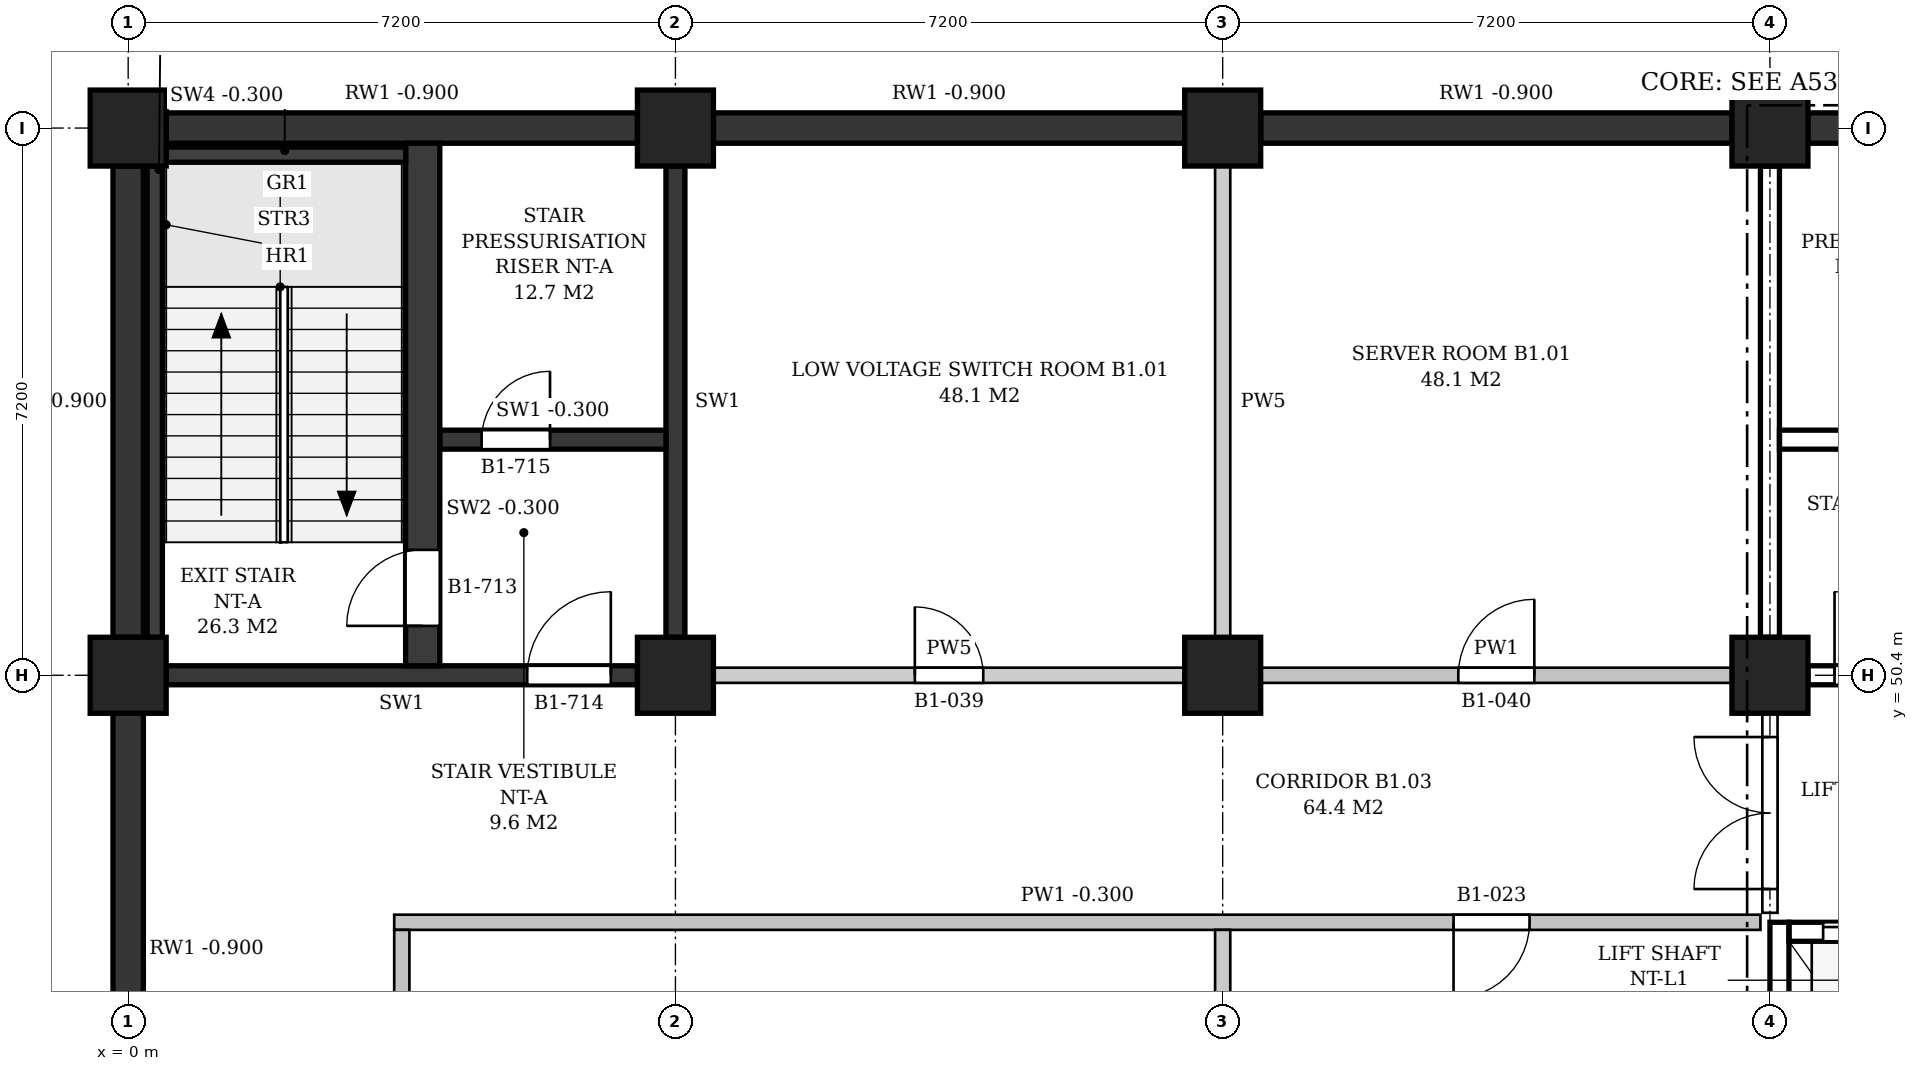
"""IFC4 building model, lengths in metres.
Left out: names, types, materials, properties, quantities, classifications, styles, units other than length and angle.
Written with IfcOpenShell. Run it as: python <this file> out.ifc"""

import sys

from ifc_helpers import new_model, si_unit, direction, frame, frame_2d, origin, origin_2d, place, context, subcontext, project, spatial, polyline, rectangle, outline, extrude, element, fill, save


model = new_model("IFC4")
c1 = context("Model", 3, precision=1e-05, world=origin(), true_north=direction((0.0, 1.0)))
c2 = subcontext(c1, "Body", "Model", "MODEL_VIEW")
j1 = project(units=[si_unit("LENGTHUNIT", "METRE"), si_unit("PLANEANGLEUNIT", "RADIAN")], contexts=[c1])
p1 = place(None, origin())
s1 = spatial("IfcSite", under=j1, at=p1, CompositionType="ELEMENT")
p2 = place(p1, origin())
s2 = spatial("IfcBuilding", under=s1, at=p2, CompositionType="ELEMENT")
p3 = place(p2, frame((0.0, 0.0, -4.5)))
s3 = spatial("IfcBuildingStorey", under=s2, at=p3, CompositionType="ELEMENT", Elevation=-4.5)
for number, where, z_axis, x_axis in (
    (1, (0.0, 50.4, 0.0), (0.0, 0.0, 1.0), (1.0, 0.0, 0.0)),
    (2, (0.0, 57.6, 0.0), (0.0, 0.0, 1.0), (1.0, 0.0, 0.0)),
    (3, (7.2, 50.4, 0.0), (0.0, 0.0, 1.0), (1.0, 0.0, 0.0)),
    (4, (7.2, 57.6, 0.0), (0.0, 0.0, 1.0), (1.0, 0.0, 0.0)),
    (5, (14.4, 50.4, 0.0), (0.0, 0.0, 1.0), (1.0, 0.0, 0.0)),
    (6, (14.4, 57.6, 0.0), (0.0, 0.0, 1.0), (1.0, 0.0, 0.0)),
    (7, (21.6, 50.4, 0.0), (0.0, 0.0, 1.0), (1.0, 0.0, 0.0)),
    (8, (21.6, 57.6, 0.0), (0.0, 0.0, 1.0), (1.0, 0.0, 0.0)),
):
    element("IfcColumn", number, at=place(p3, frame(where, z_axis=z_axis, x_axis=x_axis)), inside=s3, PredefinedType="COLUMN", context=c2, shape_type="SweptSolid", body=[
        extrude(rectangle(XDim=1.0, YDim=1.0, at=origin_2d()), origin(), (0.0, 0.0, 1.0), 4.5),
    ])
p4 = place(p3, frame((28.3, 57.6, 0.0), z_axis=(0.0, 0.0, 1.0), x_axis=(-1.0, 0.0, 0.0)))
e9 = element("IfcWall", 9, at=p4, inside=s3, PredefinedType="SOLIDWALL", context=c2, shape_type="SweptSolid", body=[
    extrude(rectangle(XDim=6.2, YDim=0.4, at=frame_2d((3.1, 0.0))), origin(), (0.0, 0.0, 1.0), 3.6),
])
p5 = place(p3, frame((21.1, 57.6, 0.0), z_axis=(0.0, 0.0, 1.0), x_axis=(-1.0, 0.0, 0.0)))
e10 = element("IfcWall", 10, at=p5, inside=s3, PredefinedType="SOLIDWALL", context=c2, shape_type="SweptSolid", body=[
    extrude(rectangle(XDim=6.2, YDim=0.4, at=frame_2d((3.1, 0.0))), origin(), (0.0, 0.0, 1.0), 3.6),
])
for number, where, z_axis, x_axis in (
    (11, (13.9, 57.6, 0.0), (0.0, 0.0, 1.0), (-1.0, 0.0, 0.0)),
    (12, (6.7, 57.6, 0.0), (0.0, 0.0, 1.0), (-1.0, 0.0, 0.0)),
):
    element("IfcWall", number, at=place(p3, frame(where, z_axis=z_axis, x_axis=x_axis)), inside=s3, PredefinedType="SOLIDWALL", context=c2, shape_type="SweptSolid", body=[
        extrude(rectangle(XDim=6.2, YDim=0.4, at=frame_2d((3.1, 0.0))), origin(), (0.0, 0.0, 1.0), 3.6),
    ])
p6 = place(p3, frame((0.0, 57.1, 0.0), z_axis=(0.0, 0.0, 1.0), x_axis=(0.0, -1.0, 0.0)))
e13 = element("IfcWall", 13, at=p6, inside=s3, PredefinedType="SOLIDWALL", context=c2, shape_type="SweptSolid", body=[
    extrude(rectangle(XDim=6.2, YDim=0.4, at=frame_2d((3.1, 0.0))), origin(), (0.0, 0.0, 1.0), 3.6),
])
p7 = place(p3, frame((0.0, 49.9, 0.0), z_axis=(0.0, 0.0, 1.0), x_axis=(0.0, -1.0, 0.0)))
e14 = element("IfcWall", 14, at=p7, inside=s3, PredefinedType="SOLIDWALL", context=c2, shape_type="SweptSolid", body=[
    extrude(rectangle(XDim=6.2, YDim=0.4, at=frame_2d((3.1, 0.0))), origin(), (0.0, 0.0, 1.0), 3.6),
])
p8 = place(p3, frame((0.5, 50.4, 0.0), z_axis=(0.0, 0.0, 1.0), x_axis=(1.0, 0.0, 0.0)))
e15 = element("IfcWall", 15, at=p8, inside=s3, PredefinedType="SHEAR", context=c2, shape_type="SweptSolid", body=[
    extrude(rectangle(XDim=6.2, YDim=0.25, at=frame_2d((3.1, 0.0))), origin(), (0.0, 0.0, 1.0), 3.4),
])
p9 = place(p8, frame((4.75, 0.0, 0.0)))
e16 = element("IfcOpeningElement", 16, at=p9, cuts=e15, PredefinedType="OPENING", context=c2, shape_type="SweptSolid", body=[
    extrude(rectangle(XDim=1.1, YDim=2.1, at=frame_2d((0.55, 1.05))), frame((0.0, 0.135, 0.0), z_axis=(0.0, -1.0, 0.0), x_axis=(1.0, 0.0, 0.0)), (0.0, 0.0, 1.0), 0.27),
])
p10 = place(p3, frame((7.2, 50.9, 0.0), z_axis=(0.0, 0.0, 1.0), x_axis=(0.0, 1.0, 0.0)))
e17 = element("IfcWall", 17, at=p10, inside=s3, PredefinedType="SHEAR", context=c2, shape_type="SweptSolid", body=[
    extrude(rectangle(XDim=6.2, YDim=0.25, at=frame_2d((3.1, 0.0))), origin(), (0.0, 0.0, 1.0), 3.4),
])
p11 = place(p3, frame((0.35, 50.9, 0.0), z_axis=(0.0, 0.0, 1.0), x_axis=(0.0, 1.0, 0.0)))
e18 = element("IfcWall", 18, at=p11, inside=s3, PredefinedType="SHEAR", context=c2, shape_type="SweptSolid", body=[
    extrude(rectangle(XDim=6.2, YDim=0.2, at=frame_2d((3.1, 0.0))), origin(), (0.0, 0.0, 1.0), 4.2),
])
p12 = place(p3, frame((0.5, 57.25, 0.0), z_axis=(0.0, 0.0, 1.0), x_axis=(1.0, 0.0, 0.0)))
e19 = element("IfcWall", 19, at=p12, inside=s3, PredefinedType="SHEAR", context=c2, shape_type="SweptSolid", body=[
    extrude(rectangle(XDim=3.15, YDim=0.2, at=frame_2d((1.575, 0.0))), origin(), (0.0, 0.0, 1.0), 4.2),
])
p13 = place(p3, frame((3.875, 50.525, 0.0), z_axis=(0.0, 0.0, 1.0), x_axis=(0.0, 1.0, 0.0)))
e20 = element("IfcWall", 20, at=p13, inside=s3, PredefinedType="SHEAR", context=c2, shape_type="SweptSolid", body=[
    extrude(rectangle(XDim=6.875, YDim=0.45, at=frame_2d((3.438, 0.0))), origin(), (0.0, 0.0, 1.0), 4.2),
])
p14 = place(p13, frame((0.525, 0.0, 0.0)))
e21 = element("IfcOpeningElement", 21, at=p14, cuts=e20, PredefinedType="OPENING", context=c2, shape_type="SweptSolid", body=[
    extrude(rectangle(XDim=1.0, YDim=2.1, at=frame_2d((0.5, 1.05))), frame((0.0, 0.235, 0.0), z_axis=(0.0, -1.0, 0.0), x_axis=(1.0, 0.0, 0.0)), (0.0, 0.0, 1.0), 0.47),
])
p15 = place(p3, frame((4.1, 53.5, 0.0), z_axis=(0.0, 0.0, 1.0), x_axis=(1.0, 0.0, 0.0)))
e22 = element("IfcWall", 22, at=p15, inside=s3, PredefinedType="SHEAR", context=c2, shape_type="SweptSolid", body=[
    extrude(rectangle(XDim=2.975, YDim=0.25, at=frame_2d((1.487, 0.0))), origin(), (0.0, 0.0, 1.0), 4.2),
])
p16 = place(p15, frame((0.55, 0.0, 0.0)))
e23 = element("IfcOpeningElement", 23, at=p16, cuts=e22, PredefinedType="OPENING", context=c2, shape_type="SweptSolid", body=[
    extrude(rectangle(XDim=0.9, YDim=2.1, at=frame_2d((0.45, 1.05))), frame((0.0, 0.135, 0.0), z_axis=(0.0, -1.0, 0.0), x_axis=(1.0, 0.0, 0.0)), (0.0, 0.0, 1.0), 0.27),
])
p17 = place(p3, frame((22.1, 50.4, 0.0), z_axis=(0.0, 0.0, 1.0), x_axis=(1.0, 0.0, 0.0)))
e24 = element("IfcWall", 24, at=p17, inside=s3, PredefinedType="SHEAR", context=c2, shape_type="SweptSolid", body=[
    extrude(rectangle(XDim=6.2, YDim=0.25, at=frame_2d((3.1, 0.0))), origin(), (0.0, 0.0, 1.0), 3.4),
])
p18 = place(p17, frame((0.35, 0.0, 0.0)))
e25 = element("IfcOpeningElement", 25, at=p18, cuts=e24, PredefinedType="OPENING", context=c2, shape_type="SweptSolid", body=[
    extrude(rectangle(XDim=1.1, YDim=2.1, at=frame_2d((0.55, 1.05))), frame((0.0, 0.135, 0.0), z_axis=(0.0, -1.0, 0.0), x_axis=(1.0, 0.0, 0.0)), (0.0, 0.0, 1.0), 0.27),
])
p19 = place(p3, frame((21.6, 50.9, 0.0), z_axis=(0.0, 0.0, 1.0), x_axis=(0.0, 1.0, 0.0)))
e26 = element("IfcWall", 26, at=p19, inside=s3, PredefinedType="SHEAR", context=c2, shape_type="SweptSolid", body=[
    extrude(rectangle(XDim=6.2, YDim=0.25, at=frame_2d((3.1, 0.0))), origin(), (0.0, 0.0, 1.0), 3.4),
])
p20 = place(p3, frame((21.725, 53.5, 0.0), z_axis=(0.0, 0.0, 1.0), x_axis=(1.0, 0.0, 0.0)))
e27 = element("IfcWall", 27, at=p20, inside=s3, PredefinedType="SHEAR", context=c2, shape_type="SweptSolid", body=[
    extrude(rectangle(XDim=2.975, YDim=0.25, at=frame_2d((1.487, 0.0))), origin(), (0.0, 0.0, 1.0), 4.2),
])
p21 = place(p20, frame((1.525, 0.0, 0.0)))
e28 = element("IfcOpeningElement", 28, at=p21, cuts=e27, PredefinedType="OPENING", context=c2, shape_type="SweptSolid", body=[
    extrude(rectangle(XDim=0.9, YDim=2.1, at=frame_2d((0.45, 1.05))), frame((0.0, 0.135, 0.0), z_axis=(0.0, -1.0, 0.0), x_axis=(1.0, 0.0, 0.0)), (0.0, 0.0, 1.0), 0.27),
])
p22 = place(p3, frame((21.725, 43.7, -1.6), z_axis=(0.0, 0.0, 1.0), x_axis=(0.0, 1.0, 0.0)))
e29 = element("IfcWall", 29, at=p22, inside=s3, PredefinedType="SHEAR", context=c2, shape_type="SweptSolid", body=[
    extrude(rectangle(XDim=3.45, YDim=0.25, at=frame_2d((1.725, 0.0))), origin(), (0.0, 0.0, 1.0), 5.0),
])
p23 = place(p3, frame((21.85, 47.025, 0.0), z_axis=(0.0, 0.0, 1.0), x_axis=(1.0, 0.0, 0.0)))
e30 = element("IfcWall", 30, at=p23, inside=s3, PredefinedType="SHEAR", context=c2, shape_type="SweptSolid", body=[
    extrude(rectangle(XDim=2.0, YDim=0.25, at=frame_2d((1.0, 0.0))), origin(), (0.0, 0.0, 1.0), 4.2),
])
p24 = place(p23, frame((0.45, 0.0, 0.0)))
e31 = element("IfcOpeningElement", 31, at=p24, cuts=e30, PredefinedType="OPENING", context=c2, shape_type="SweptSolid", body=[
    extrude(rectangle(XDim=1.1, YDim=2.1, at=frame_2d((0.55, 1.05))), frame((0.0, 0.135, 0.0), z_axis=(0.0, -1.0, 0.0), x_axis=(1.0, 0.0, 0.0)), (0.0, 0.0, 1.0), 0.27),
])
p25 = place(p3, frame((3.5, 47.15, 0.0), z_axis=(0.0, 0.0, 1.0), x_axis=(1.0, 0.0, 0.0)))
e32 = element("IfcWall", 32, at=p25, inside=s3, PredefinedType="PARTITIONING", context=c2, shape_type="SweptSolid", body=[
    extrude(outline(polyline([(0.0, 0.0), (17.975, 0.0), (17.975, 3.4), (17.8, 3.4), (17.8, 4.2), (11.2, 4.2), (11.2, 3.4), (10.6, 3.4), (10.6, 4.2), (4.0, 4.2), (4.0, 3.4), (3.4, 3.4), (3.4, 4.2), (0.0, 4.2), (0.0, 0.0)])), frame((0.0, 0.1, 0.0), z_axis=(0.0, -1.0, 0.0), x_axis=(1.0, 0.0, 0.0)), (0.0, 0.0, 1.0), 0.2),
])
p26 = place(p25, frame((13.938, 0.0, 0.0)))
e33 = element("IfcOpeningElement", 33, at=p26, cuts=e32, PredefinedType="OPENING", context=c2, shape_type="SweptSolid", body=[
    extrude(rectangle(XDim=1.0, YDim=2.1, at=frame_2d((0.5, 1.05))), frame((0.0, 0.11, 0.0), z_axis=(0.0, -1.0, 0.0), x_axis=(1.0, 0.0, 0.0)), (0.0, 0.0, 1.0), 0.22),
])
p27 = place(p3, frame((7.7, 50.4, 0.0), z_axis=(0.0, 0.0, 1.0), x_axis=(1.0, 0.0, 0.0)))
e34 = element("IfcWall", 34, at=p27, inside=s3, PredefinedType="SOLIDWALL", context=c2, shape_type="SweptSolid", body=[
    extrude(rectangle(XDim=6.2, YDim=0.2, at=frame_2d((3.1, 0.0))), origin(), (0.0, 0.0, 1.0), 3.4),
])
p28 = place(p27, frame((2.65, 0.0, 0.0)))
e35 = element("IfcOpeningElement", 35, at=p28, cuts=e34, PredefinedType="OPENING", context=c2, shape_type="SweptSolid", body=[
    extrude(rectangle(XDim=0.9, YDim=2.1, at=frame_2d((0.45, 1.05))), frame((0.0, 0.11, 0.0), z_axis=(0.0, -1.0, 0.0), x_axis=(1.0, 0.0, 0.0)), (0.0, 0.0, 1.0), 0.22),
])
p29 = place(p3, frame((14.9, 50.4, 0.0), z_axis=(0.0, 0.0, 1.0), x_axis=(1.0, 0.0, 0.0)))
e36 = element("IfcWall", 36, at=p29, inside=s3, PredefinedType="PARTITIONING", context=c2, shape_type="SweptSolid", body=[
    extrude(rectangle(XDim=6.2, YDim=0.2, at=frame_2d((3.1, 0.0))), origin(), (0.0, 0.0, 1.0), 3.4),
])
p30 = place(p29, frame((2.6, 0.0, 0.0)))
e37 = element("IfcOpeningElement", 37, at=p30, cuts=e36, PredefinedType="OPENING", context=c2, shape_type="SweptSolid", body=[
    extrude(rectangle(XDim=1.0, YDim=2.1, at=frame_2d((0.5, 1.05))), frame((0.0, 0.11, 0.0), z_axis=(0.0, -1.0, 0.0), x_axis=(1.0, 0.0, 0.0)), (0.0, 0.0, 1.0), 0.22),
])
p31 = place(p3, frame((3.6, 32.5, 0.0), z_axis=(0.0, 0.0, 1.0), x_axis=(0.0, 1.0, 0.0)))
e38 = element("IfcWall", 38, at=p31, inside=s3, PredefinedType="PARTITIONING", context=c2, shape_type="SweptSolid", body=[
    extrude(outline(polyline([(0.0, 0.0), (14.55, 0.0), (14.55, 4.2), (11.0, 4.2), (11.0, 3.4), (10.4, 3.4), (10.4, 4.2), (3.8, 4.2), (3.8, 3.4), (3.2, 3.4), (3.2, 4.2), (0.0, 4.2), (0.0, 0.0)])), frame((0.0, 0.1, 0.0), z_axis=(0.0, -1.0, 0.0), x_axis=(1.0, 0.0, 0.0)), (0.0, 0.0, 1.0), 0.2),
])
p32 = place(p31, frame((6.775, 0.0, 0.0)))
e39 = element("IfcOpeningElement", 39, at=p32, cuts=e38, PredefinedType="OPENING", context=c2, shape_type="SweptSolid", body=[
    extrude(rectangle(XDim=1.0, YDim=2.1, at=frame_2d((0.5, 1.05))), frame((0.0, 0.11, 0.0), z_axis=(0.0, -1.0, 0.0), x_axis=(1.0, 0.0, 0.0)), (0.0, 0.0, 1.0), 0.22),
])
p33 = place(p3, frame((14.4, 43.7, 0.0), z_axis=(0.0, 0.0, 1.0), x_axis=(0.0, 1.0, 0.0)))
e40 = element("IfcWall", 40, at=p33, inside=s3, PredefinedType="PARTITIONING", context=c2, shape_type="SweptSolid", body=[
    extrude(rectangle(XDim=3.35, YDim=0.2, at=frame_2d((1.675, 0.0))), origin(), (0.0, 0.0, 1.0), 3.4),
])
p34 = place(p3, frame((14.4, 50.9, 0.0), z_axis=(0.0, 0.0, 1.0), x_axis=(0.0, 1.0, 0.0)))
e41 = element("IfcWall", 41, at=p34, inside=s3, PredefinedType="SOLIDWALL", context=c2, shape_type="SweptSolid", body=[
    extrude(rectangle(XDim=6.2, YDim=0.2, at=frame_2d((3.1, 0.0))), origin(), (0.0, 0.0, 1.0), 3.4),
])
p35 = place(p3, frame((21.6, 47.275, 0.0), z_axis=(0.0, 0.0, 1.0), x_axis=(0.0, 1.0, 0.0)))
e42 = element("IfcWall", 42, at=p35, inside=s3, PredefinedType="PARTITIONING", context=c2, shape_type="SweptSolid", body=[
    extrude(rectangle(XDim=2.625, YDim=0.2, at=frame_2d((1.312, 0.0))), origin(), (0.0, 0.0, 1.0), 3.4),
])
p36 = place(p35, frame((0.312, 0.0, 0.0)))
e43 = element("IfcOpeningElement", 43, at=p36, cuts=e42, PredefinedType="OPENING", context=c2, shape_type="SweptSolid", body=[
    extrude(rectangle(XDim=2.0, YDim=2.4, at=frame_2d((1.0, 1.2))), frame((0.0, 0.11, 0.0), z_axis=(0.0, -1.0, 0.0), x_axis=(1.0, 0.0, 0.0)), (0.0, 0.0, 1.0), 0.22),
])
p37 = place(p14, origin())
e44 = element("IfcDoor", 44, at=p37, inside=s3, OperationType="SINGLE_SWING_LEFT", PredefinedType="DOOR", context=c2, shape_type="SweptSolid", body=[
    extrude(rectangle(XDim=1.0, YDim=2.1, at=frame_2d((0.5, 1.05))), frame((0.0, 0.025, 0.0), z_axis=(0.0, -1.0, 0.0), x_axis=(1.0, 0.0, 0.0)), (0.0, 0.0, 1.0), 0.05),
])
fill(e21, e44)
p38 = place(p9, origin())
e45 = element("IfcDoor", 45, at=p38, inside=s3, OperationType="SINGLE_SWING_RIGHT", PredefinedType="DOOR", context=c2, shape_type="SweptSolid", body=[
    extrude(rectangle(XDim=1.1, YDim=2.1, at=frame_2d((0.55, 1.05))), frame((0.0, 0.025, 0.0), z_axis=(0.0, -1.0, 0.0), x_axis=(1.0, 0.0, 0.0)), (0.0, 0.0, 1.0), 0.05),
])
fill(e16, e45)
p39 = place(p16, origin())
e46 = element("IfcDoor", 46, at=p39, inside=s3, OperationType="SINGLE_SWING_RIGHT", PredefinedType="DOOR", context=c2, shape_type="SweptSolid", body=[
    extrude(rectangle(XDim=0.9, YDim=2.1, at=frame_2d((0.45, 1.05))), frame((0.0, 0.025, 0.0), z_axis=(0.0, -1.0, 0.0), x_axis=(1.0, 0.0, 0.0)), (0.0, 0.0, 1.0), 0.05),
])
fill(e23, e46)
p40 = place(p18, origin())
e47 = element("IfcDoor", 47, at=p40, inside=s3, OperationType="SINGLE_SWING_LEFT", PredefinedType="DOOR", context=c2, shape_type="SweptSolid", body=[
    extrude(rectangle(XDim=1.1, YDim=2.1, at=frame_2d((0.55, 1.05))), frame((0.0, 0.025, 0.0), z_axis=(0.0, -1.0, 0.0), x_axis=(1.0, 0.0, 0.0)), (0.0, 0.0, 1.0), 0.05),
])
fill(e25, e47)
p41 = place(p24, origin())
e48 = element("IfcDoor", 48, at=p41, inside=s3, OperationType="SLIDING_TO_LEFT", PredefinedType="DOOR", context=c2, shape_type="SweptSolid", body=[
    extrude(rectangle(XDim=1.1, YDim=2.1, at=frame_2d((0.55, 1.05))), frame((0.0, 0.025, 0.0), z_axis=(0.0, -1.0, 0.0), x_axis=(1.0, 0.0, 0.0)), (0.0, 0.0, 1.0), 0.05),
])
fill(e31, e48)
p42 = place(p36, origin())
e49 = element("IfcDoor", 49, at=p42, inside=s3, OperationType="DOUBLE_DOOR_SINGLE_SWING", PredefinedType="DOOR", context=c2, shape_type="SweptSolid", body=[
    extrude(rectangle(XDim=2.0, YDim=2.4, at=frame_2d((1.0, 1.2))), frame((0.0, 0.025, 0.0), z_axis=(0.0, -1.0, 0.0), x_axis=(1.0, 0.0, 0.0)), (0.0, 0.0, 1.0), 0.05),
])
fill(e43, e49)
p43 = place(p26, frame((1.0, 0.0, 0.0), z_axis=(0.0, 0.0, 1.0), x_axis=(-1.0, 0.0, 0.0)))
e50 = element("IfcDoor", 50, at=p43, inside=s3, OperationType="SINGLE_SWING_RIGHT", PredefinedType="DOOR", context=c2, shape_type="SweptSolid", body=[
    extrude(rectangle(XDim=1.0, YDim=2.1, at=frame_2d((0.5, 1.05))), frame((0.0, 0.025, 0.0), z_axis=(0.0, -1.0, 0.0), x_axis=(1.0, 0.0, 0.0)), (0.0, 0.0, 1.0), 0.05),
])
fill(e33, e50)
p44 = place(p28, origin())
e51 = element("IfcDoor", 51, at=p44, inside=s3, OperationType="SINGLE_SWING_LEFT", PredefinedType="DOOR", context=c2, shape_type="SweptSolid", body=[
    extrude(rectangle(XDim=0.9, YDim=2.1, at=frame_2d((0.45, 1.05))), frame((0.0, 0.025, 0.0), z_axis=(0.0, -1.0, 0.0), x_axis=(1.0, 0.0, 0.0)), (0.0, 0.0, 1.0), 0.05),
])
fill(e35, e51)
p45 = place(p30, origin())
e52 = element("IfcDoor", 52, at=p45, inside=s3, OperationType="SINGLE_SWING_RIGHT", PredefinedType="DOOR", context=c2, shape_type="SweptSolid", body=[
    extrude(rectangle(XDim=1.0, YDim=2.1, at=frame_2d((0.5, 1.05))), frame((0.0, 0.025, 0.0), z_axis=(0.0, -1.0, 0.0), x_axis=(1.0, 0.0, 0.0)), (0.0, 0.0, 1.0), 0.05),
])
fill(e37, e52)
save(model, sys.argv[1])
